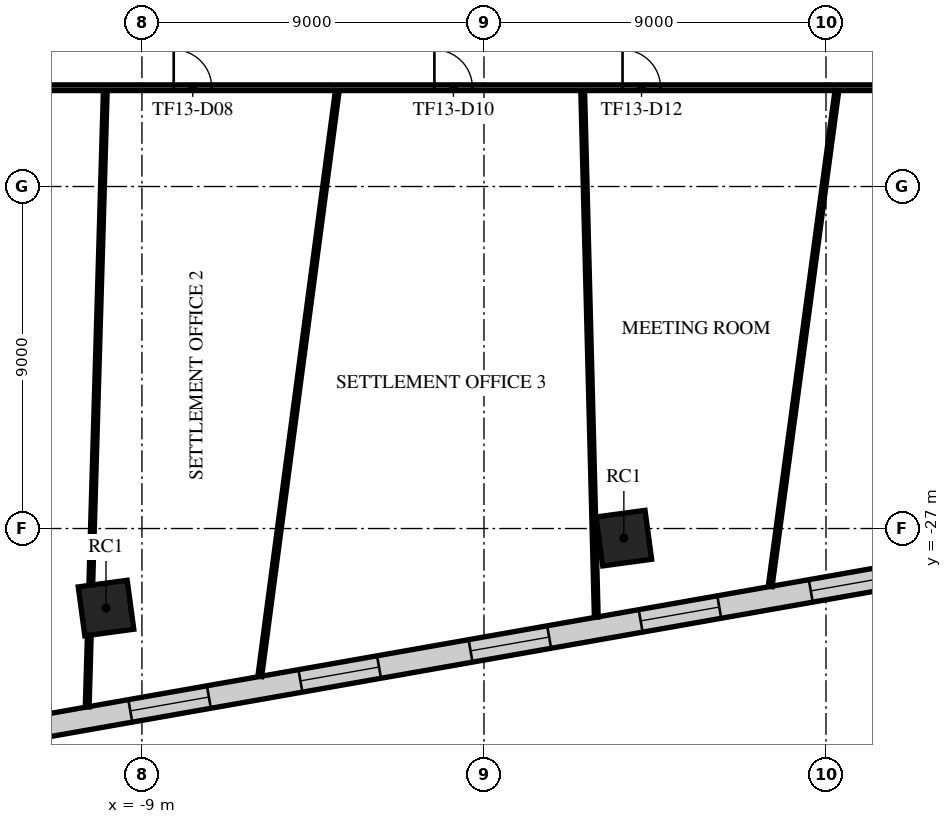
"""IFC4 building model, lengths in metres.
Left out: names, types, materials, properties, quantities, classifications, styles, units other than length and angle.
Written with IfcOpenShell. Run it as: python <this file> out.ifc"""

import sys

from ifc_helpers import new_model, si_unit, direction, frame, frame_2d, origin, origin_2d, place, context, subcontext, project, spatial, rectangle, extrude, element, fill, save


model = new_model("IFC4")
c1 = context("Model", 3, precision=1e-05, world=origin(), true_north=direction((0.0, 1.0)))
c2 = subcontext(c1, "Body", "Model", "MODEL_VIEW")
j1 = project(units=[si_unit("LENGTHUNIT", "METRE"), si_unit("PLANEANGLEUNIT", "RADIAN")], contexts=[c1])
p1 = place(None, origin())
s1 = spatial("IfcSite", under=j1, at=p1, CompositionType="ELEMENT")
p2 = place(p1, origin())
s2 = spatial("IfcBuilding", under=s1, at=p2, CompositionType="ELEMENT")
p3 = place(p2, frame((0.0, 0.0, 59.7)))
s3 = spatial("IfcBuildingStorey", under=s2, at=p3, CompositionType="ELEMENT", Elevation=59.7)
for number, where, z_axis, x_axis in (
    (1, (-9.945, -29.093, 0.0), (0.0, 0.0, 1.0), (0.991, 0.134, 0.0)),
    (2, (3.681, -27.253, 0.0), (0.0, 0.0, 1.0), (0.991, 0.134, 0.0)),
):
    element("IfcColumn", number, at=place(p3, frame(where, z_axis=z_axis, x_axis=x_axis)), inside=s3, PredefinedType="COLUMN", context=c2, shape_type="SweptSolid", body=[
        extrude(rectangle(XDim=1.3, YDim=1.3, at=origin_2d()), origin(), (0.0, 0.0, 1.0), 4.2),
    ])
p4 = place(p3, frame((-19.341, -33.568, 0.0), z_axis=(0.0, 0.0, 1.0), x_axis=(0.984808200104, 0.173645642064, 0.0)))
e3 = element("IfcWall", 3, at=p4, inside=s3, PredefinedType="STANDARD", context=c2, shape_type="SweptSolid", body=[
    extrude(rectangle(XDim=49.752, YDim=0.6, at=frame_2d((24.876, 0.0))), origin(), (0.0, 0.0, 1.0), 3.75),
])
p5 = place(p4, frame((1.161, 0.0, 0.9)))
e4 = element("IfcOpeningElement", 4, at=p5, cuts=e3, PredefinedType="OPENING", context=c2, shape_type="SweptSolid", body=[
    extrude(rectangle(XDim=2.1, YDim=2.1, at=frame_2d((1.05, 1.05))), frame((0.0, 0.31, 0.0), z_axis=(0.0, -1.0, 0.0), x_axis=(1.0, 0.0, 0.0)), (0.0, 0.0, 1.0), 0.62),
])
p6 = place(p4, frame((5.644, 0.0, 0.9)))
e5 = element("IfcOpeningElement", 5, at=p6, cuts=e3, PredefinedType="OPENING", context=c2, shape_type="SweptSolid", body=[
    extrude(rectangle(XDim=2.1, YDim=2.1, at=frame_2d((1.05, 1.05))), frame((0.0, 0.31, 0.0), z_axis=(0.0, -1.0, 0.0), x_axis=(1.0, 0.0, 0.0)), (0.0, 0.0, 1.0), 0.62),
])
p7 = place(p4, frame((10.189, 0.0, 0.9)))
e6 = element("IfcOpeningElement", 6, at=p7, cuts=e3, PredefinedType="OPENING", context=c2, shape_type="SweptSolid", body=[
    extrude(rectangle(XDim=2.1, YDim=2.1, at=frame_2d((1.05, 1.05))), frame((0.0, 0.31, 0.0), z_axis=(0.0, -1.0, 0.0), x_axis=(1.0, 0.0, 0.0)), (0.0, 0.0, 1.0), 0.62),
])
p8 = place(p4, frame((14.735, 0.0, 0.9)))
e7 = element("IfcOpeningElement", 7, at=p8, cuts=e3, PredefinedType="OPENING", context=c2, shape_type="SweptSolid", body=[
    extrude(rectangle(XDim=2.1, YDim=2.1, at=frame_2d((1.05, 1.05))), frame((0.0, 0.31, 0.0), z_axis=(0.0, -1.0, 0.0), x_axis=(1.0, 0.0, 0.0)), (0.0, 0.0, 1.0), 0.62),
])
p9 = place(p4, frame((19.28, 0.0, 0.9)))
e8 = element("IfcOpeningElement", 8, at=p9, cuts=e3, PredefinedType="OPENING", context=c2, shape_type="SweptSolid", body=[
    extrude(rectangle(XDim=2.1, YDim=2.1, at=frame_2d((1.05, 1.05))), frame((0.0, 0.31, 0.0), z_axis=(0.0, -1.0, 0.0), x_axis=(1.0, 0.0, 0.0)), (0.0, 0.0, 1.0), 0.62),
])
p10 = place(p4, frame((23.826, 0.0, 0.9)))
e9 = element("IfcOpeningElement", 9, at=p10, cuts=e3, PredefinedType="OPENING", context=c2, shape_type="SweptSolid", body=[
    extrude(rectangle(XDim=2.1, YDim=2.1, at=frame_2d((1.05, 1.05))), frame((0.0, 0.31, 0.0), z_axis=(0.0, -1.0, 0.0), x_axis=(1.0, 0.0, 0.0)), (0.0, 0.0, 1.0), 0.62),
])
p11 = place(p4, frame((28.371, 0.0, 0.9)))
e10 = element("IfcOpeningElement", 10, at=p11, cuts=e3, PredefinedType="OPENING", context=c2, shape_type="SweptSolid", body=[
    extrude(rectangle(XDim=2.1, YDim=2.1, at=frame_2d((1.05, 1.05))), frame((0.0, 0.31, 0.0), z_axis=(0.0, -1.0, 0.0), x_axis=(1.0, 0.0, 0.0)), (0.0, 0.0, 1.0), 0.62),
])
p12 = place(p4, frame((32.917, 0.0, 0.9)))
e11 = element("IfcOpeningElement", 11, at=p12, cuts=e3, PredefinedType="OPENING", context=c2, shape_type="SweptSolid", body=[
    extrude(rectangle(XDim=2.1, YDim=2.1, at=frame_2d((1.05, 1.05))), frame((0.0, 0.31, 0.0), z_axis=(0.0, -1.0, 0.0), x_axis=(1.0, 0.0, 0.0)), (0.0, 0.0, 1.0), 0.62),
])
p13 = place(p4, frame((37.462, 0.0, 0.9)))
e12 = element("IfcOpeningElement", 12, at=p13, cuts=e3, PredefinedType="OPENING", context=c2, shape_type="SweptSolid", body=[
    extrude(rectangle(XDim=2.1, YDim=2.1, at=frame_2d((1.05, 1.05))), frame((0.0, 0.31, 0.0), z_axis=(0.0, -1.0, 0.0), x_axis=(1.0, 0.0, 0.0)), (0.0, 0.0, 1.0), 0.62),
])
p14 = place(p4, frame((42.008, 0.0, 0.9)))
e13 = element("IfcOpeningElement", 13, at=p14, cuts=e3, PredefinedType="OPENING", context=c2, shape_type="SweptSolid", body=[
    extrude(rectangle(XDim=2.1, YDim=2.1, at=frame_2d((1.05, 1.05))), frame((0.0, 0.31, 0.0), z_axis=(0.0, -1.0, 0.0), x_axis=(1.0, 0.0, 0.0)), (0.0, 0.0, 1.0), 0.62),
])
p15 = place(p4, frame((46.491, 0.0, 0.9)))
e14 = element("IfcOpeningElement", 14, at=p15, cuts=e3, PredefinedType="OPENING", context=c2, shape_type="SweptSolid", body=[
    extrude(rectangle(XDim=2.1, YDim=2.1, at=frame_2d((1.05, 1.05))), frame((0.0, 0.31, 0.0), z_axis=(0.0, -1.0, 0.0), x_axis=(1.0, 0.0, 0.0)), (0.0, 0.0, 1.0), 0.62),
])
p16 = place(p3, frame((-15.325, -15.4, 0.0), z_axis=(0.0, 0.0, 1.0), x_axis=(1.0, 0.0, 0.0)))
e15 = element("IfcWall", 15, at=p16, inside=s3, PredefinedType="PARTITIONING", context=c2, shape_type="SweptSolid", body=[
    extrude(rectangle(XDim=30.725, YDim=0.15, at=frame_2d((15.362, 0.0))), origin(), (0.0, 0.0, 1.0), 3.25),
])
p17 = place(p16, frame((1.3, 0.0, 0.0)))
e16 = element("IfcOpeningElement", 16, at=p17, cuts=e15, PredefinedType="OPENING", context=c2, shape_type="SweptSolid", body=[
    extrude(rectangle(XDim=1.8, YDim=2.1, at=frame_2d((0.9, 1.05))), frame((0.0, 0.085, 0.0), z_axis=(0.0, -1.0, 0.0), x_axis=(1.0, 0.0, 0.0)), (0.0, 0.0, 1.0), 0.17),
])
p18 = place(p16, frame((7.161, 0.0, 0.0)))
e17 = element("IfcOpeningElement", 17, at=p18, cuts=e15, PredefinedType="OPENING", context=c2, shape_type="SweptSolid", body=[
    extrude(rectangle(XDim=1.0, YDim=2.1, at=frame_2d((0.5, 1.05))), frame((0.0, 0.085, 0.0), z_axis=(0.0, -1.0, 0.0), x_axis=(1.0, 0.0, 0.0)), (0.0, 0.0, 1.0), 0.17),
])
p19 = place(p16, frame((14.021, 0.0, 0.0)))
e18 = element("IfcOpeningElement", 18, at=p19, cuts=e15, PredefinedType="OPENING", context=c2, shape_type="SweptSolid", body=[
    extrude(rectangle(XDim=1.0, YDim=2.1, at=frame_2d((0.5, 1.05))), frame((0.0, 0.085, 0.0), z_axis=(0.0, -1.0, 0.0), x_axis=(1.0, 0.0, 0.0)), (0.0, 0.0, 1.0), 0.17),
])
p20 = place(p16, frame((18.971, 0.0, 0.0)))
e19 = element("IfcOpeningElement", 19, at=p20, cuts=e15, PredefinedType="OPENING", context=c2, shape_type="SweptSolid", body=[
    extrude(rectangle(XDim=1.0, YDim=2.1, at=frame_2d((0.5, 1.05))), frame((0.0, 0.085, 0.0), z_axis=(0.0, -1.0, 0.0), x_axis=(1.0, 0.0, 0.0)), (0.0, 0.0, 1.0), 0.17),
])
p21 = place(p16, frame((27.917, 0.0, 0.0)))
e20 = element("IfcOpeningElement", 20, at=p21, cuts=e15, PredefinedType="OPENING", context=c2, shape_type="SweptSolid", body=[
    extrude(rectangle(XDim=1.8, YDim=2.1, at=frame_2d((0.9, 1.05))), frame((0.0, 0.085, 0.0), z_axis=(0.0, -1.0, 0.0), x_axis=(1.0, 0.0, 0.0)), (0.0, 0.0, 1.0), 0.17),
])
p22 = place(p3, frame((-10.44, -31.692, 0.0), z_axis=(0.0, 0.0, 1.0), x_axis=(0.02927344119, 0.999571440989, 0.0)))
e21 = element("IfcWall", 21, at=p22, inside=s3, PredefinedType="PARTITIONING", context=c2, shape_type="SweptSolid", body=[
    extrude(rectangle(XDim=1.885, YDim=0.1, at=frame_2d((0.942, 0.0))), origin(), (0.0, 0.0, 1.0), 3.75),
])
p23 = place(p3, frame((-10.346, -28.491, 0.0), z_axis=(0.0, 0.0, 1.0), x_axis=(0.029345051756, 0.999569341235, 0.0)))
e22 = element("IfcWall", 22, at=p23, inside=s3, PredefinedType="PARTITIONING", context=c2, shape_type="SweptSolid", body=[
    extrude(rectangle(XDim=13.02, YDim=0.1, at=frame_2d((6.51, 0.0))), origin(), (0.0, 0.0, 1.0), 3.25),
])
p24 = place(p3, frame((-5.899, -30.892, 0.0), z_axis=(0.0, 0.0, 1.0), x_axis=(0.131193510247, 0.991356778798, 0.0)))
e23 = element("IfcWall", 23, at=p24, inside=s3, PredefinedType="PARTITIONING", context=c2, shape_type="SweptSolid", body=[
    extrude(rectangle(XDim=15.544, YDim=0.1, at=frame_2d((7.772, 0.0))), origin(), (0.0, 0.0, 1.0), 2.95),
])
p25 = place(p3, frame((2.598, -15.476, 0.0), z_axis=(0.0, 0.0, 1.0), x_axis=(0.025790593623, -0.999667367318, 0.0)))
e24 = element("IfcWall", 24, at=p25, inside=s3, PredefinedType="PARTITIONING", context=c2, shape_type="SweptSolid", body=[
    extrude(rectangle(XDim=13.859, YDim=0.1, at=frame_2d((6.929, 0.0))), origin(), (0.0, 0.0, 1.0), 2.95),
])
p26 = place(p3, frame((7.531, -28.524, 0.0), z_axis=(0.0, 0.0, 1.0), x_axis=(0.133336319453, 0.99107084808, 0.0)))
e25 = element("IfcWall", 25, at=p26, inside=s3, PredefinedType="PARTITIONING", context=c2, shape_type="SweptSolid", body=[
    extrude(rectangle(XDim=13.159, YDim=0.1, at=frame_2d((6.58, 0.0))), origin(), (0.0, 0.0, 1.0), 2.95),
])
p27 = place(p7, origin())
e26 = element("IfcWindow", 26, at=p27, inside=s3, PartitioningType="SINGLE_PANEL", PredefinedType="WINDOW", context=c2, shape_type="SweptSolid", body=[
    extrude(rectangle(XDim=2.1, YDim=2.1, at=frame_2d((1.05, 1.05))), frame((0.0, 0.03, 0.0), z_axis=(0.0, -1.0, 0.0), x_axis=(1.0, 0.0, 0.0)), (0.0, 0.0, 1.0), 0.06),
])
fill(e6, e26)
p28 = place(p8, origin())
e27 = element("IfcWindow", 27, at=p28, inside=s3, PartitioningType="SINGLE_PANEL", PredefinedType="WINDOW", context=c2, shape_type="SweptSolid", body=[
    extrude(rectangle(XDim=2.1, YDim=2.1, at=frame_2d((1.05, 1.05))), frame((0.0, 0.03, 0.0), z_axis=(0.0, -1.0, 0.0), x_axis=(1.0, 0.0, 0.0)), (0.0, 0.0, 1.0), 0.06),
])
fill(e7, e27)
p29 = place(p9, origin())
e28 = element("IfcWindow", 28, at=p29, inside=s3, PartitioningType="SINGLE_PANEL", PredefinedType="WINDOW", context=c2, shape_type="SweptSolid", body=[
    extrude(rectangle(XDim=2.1, YDim=2.1, at=frame_2d((1.05, 1.05))), frame((0.0, 0.03, 0.0), z_axis=(0.0, -1.0, 0.0), x_axis=(1.0, 0.0, 0.0)), (0.0, 0.0, 1.0), 0.06),
])
fill(e8, e28)
p30 = place(p10, origin())
e29 = element("IfcWindow", 29, at=p30, inside=s3, PartitioningType="SINGLE_PANEL", PredefinedType="WINDOW", context=c2, shape_type="SweptSolid", body=[
    extrude(rectangle(XDim=2.1, YDim=2.1, at=frame_2d((1.05, 1.05))), frame((0.0, 0.03, 0.0), z_axis=(0.0, -1.0, 0.0), x_axis=(1.0, 0.0, 0.0)), (0.0, 0.0, 1.0), 0.06),
])
fill(e9, e29)
p31 = place(p11, origin())
e30 = element("IfcWindow", 30, at=p31, inside=s3, PartitioningType="SINGLE_PANEL", PredefinedType="WINDOW", context=c2, shape_type="SweptSolid", body=[
    extrude(rectangle(XDim=2.1, YDim=2.1, at=frame_2d((1.05, 1.05))), frame((0.0, 0.03, 0.0), z_axis=(0.0, -1.0, 0.0), x_axis=(1.0, 0.0, 0.0)), (0.0, 0.0, 1.0), 0.06),
])
fill(e10, e30)
p32 = place(p18, frame((1.0, 0.0, 0.0), z_axis=(0.0, 0.0, 1.0), x_axis=(-1.0, 0.0, 0.0)))
e31 = element("IfcDoor", 31, at=p32, inside=s3, OperationType="SINGLE_SWING_LEFT", PredefinedType="DOOR", context=c2, shape_type="SweptSolid", body=[
    extrude(rectangle(XDim=1.0, YDim=2.1, at=frame_2d((0.5, 1.05))), frame((0.0, 0.025, 0.0), z_axis=(0.0, -1.0, 0.0), x_axis=(1.0, 0.0, 0.0)), (0.0, 0.0, 1.0), 0.05),
])
fill(e17, e31)
p33 = place(p19, frame((1.0, 0.0, 0.0), z_axis=(0.0, 0.0, 1.0), x_axis=(-1.0, 0.0, 0.0)))
e32 = element("IfcDoor", 32, at=p33, inside=s3, OperationType="SINGLE_SWING_RIGHT", PredefinedType="DOOR", context=c2, shape_type="SweptSolid", body=[
    extrude(rectangle(XDim=1.0, YDim=2.1, at=frame_2d((0.5, 1.05))), frame((0.0, 0.025, 0.0), z_axis=(0.0, -1.0, 0.0), x_axis=(1.0, 0.0, 0.0)), (0.0, 0.0, 1.0), 0.05),
])
fill(e18, e32)
p34 = place(p20, frame((1.0, 0.0, 0.0), z_axis=(0.0, 0.0, 1.0), x_axis=(-1.0, 0.0, 0.0)))
e33 = element("IfcDoor", 33, at=p34, inside=s3, OperationType="SINGLE_SWING_RIGHT", PredefinedType="DOOR", context=c2, shape_type="SweptSolid", body=[
    extrude(rectangle(XDim=1.0, YDim=2.1, at=frame_2d((0.5, 1.05))), frame((0.0, 0.025, 0.0), z_axis=(0.0, -1.0, 0.0), x_axis=(1.0, 0.0, 0.0)), (0.0, 0.0, 1.0), 0.05),
])
fill(e19, e33)
save(model, sys.argv[1])
